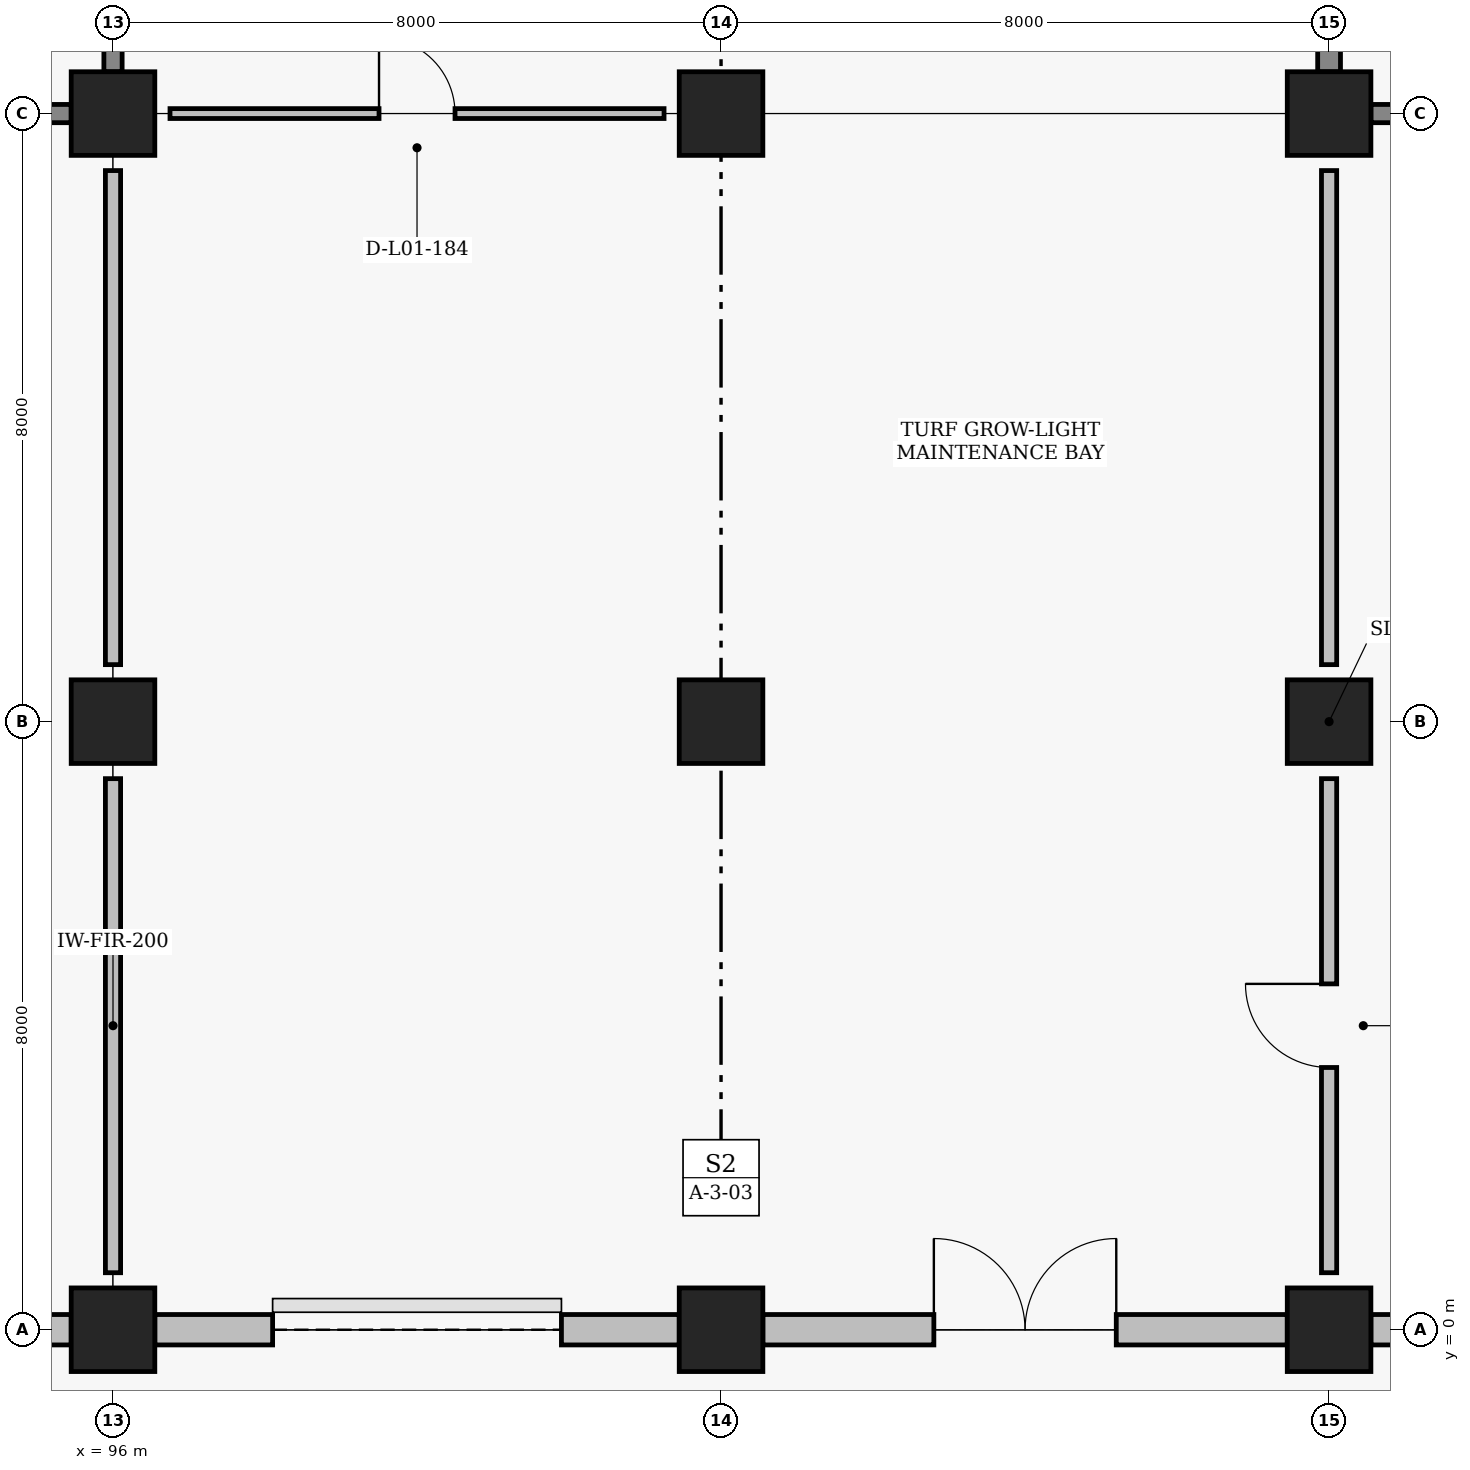
"""IFC4 building model, lengths in metres.
Left out: names, types, materials, properties, quantities, classifications, styles, units other than length and angle.
Written with IfcOpenShell. Run it as: python <this file> out.ifc"""

import sys

from ifc_helpers import new_model, si_unit, direction, frame, frame_2d, origin, origin_2d, place, context, subcontext, project, spatial, rectangle, extrude, element, fill, save


model = new_model("IFC4")
c1 = context("Model", 3, precision=1e-05, world=origin(), true_north=direction((0.0, 1.0)))
c2 = subcontext(c1, "Body", "Model", "MODEL_VIEW")
j1 = project(units=[si_unit("LENGTHUNIT", "METRE"), si_unit("PLANEANGLEUNIT", "RADIAN")], contexts=[c1])
p1 = place(None, origin())
s1 = spatial("IfcSite", under=j1, at=p1, CompositionType="ELEMENT")
p2 = place(p1, origin())
s2 = spatial("IfcBuilding", under=s1, at=p2, CompositionType="ELEMENT")
p3 = place(p2, origin())
s3 = spatial("IfcBuildingStorey", under=s2, at=p3, CompositionType="ELEMENT", Elevation=0.0)
for number, where, z_axis, x_axis in (
    (1, (96.0, 0.0, 0.0), (0.0, 0.0, 1.0), (1.0, 0.0, 0.0)),
    (2, (96.0, 8.0, 0.0), (0.0, 0.0, 1.0), (1.0, 0.0, 0.0)),
    (3, (96.0, 16.0, 0.0), (0.0, 0.0, 1.0), (1.0, 0.0, 0.0)),
    (4, (104.0, 0.0, 0.0), (0.0, 0.0, 1.0), (1.0, 0.0, 0.0)),
    (5, (104.0, 8.0, 0.0), (0.0, 0.0, 1.0), (1.0, 0.0, 0.0)),
    (6, (104.0, 16.0, 0.0), (0.0, 0.0, 1.0), (1.0, 0.0, 0.0)),
    (7, (112.0, 0.0, 0.0), (0.0, 0.0, 1.0), (1.0, 0.0, 0.0)),
    (8, (112.0, 8.0, 0.0), (0.0, 0.0, 1.0), (1.0, 0.0, 0.0)),
    (9, (112.0, 16.0, 0.0), (0.0, 0.0, 1.0), (1.0, 0.0, 0.0)),
):
    element("IfcColumn", number, at=place(p3, frame(where, z_axis=z_axis, x_axis=x_axis)), inside=s3, PredefinedType="COLUMN", context=c2, shape_type="SweptSolid", body=[
        extrude(rectangle(XDim=1.1, YDim=1.1, at=origin_2d()), origin(), (0.0, 0.0, 1.0), 4.8),
    ])
p4 = place(p3, frame((95.45, 0.0, 0.0), z_axis=(0.0, 0.0, 1.0), x_axis=(-1.0, 0.0, 0.0)))
e10 = element("IfcWall", 10, at=p4, inside=s3, PredefinedType="SOLIDWALL", context=c2, shape_type="SweptSolid", body=[
    extrude(rectangle(XDim=6.9, YDim=0.4, at=frame_2d((3.45, 0.0))), origin(), (0.0, 0.0, 1.0), 3.81),
])
p5 = place(p4, frame((2.75, 0.0, 0.0)))
e11 = element("IfcOpeningElement", 11, at=p5, cuts=e10, PredefinedType="OPENING", context=c2, shape_type="SweptSolid", body=[
    extrude(rectangle(XDim=1.4, YDim=2.2, at=frame_2d((0.7, 1.1))), frame((0.0, 0.21, 0.0), z_axis=(0.0, -1.0, 0.0), x_axis=(1.0, 0.0, 0.0)), (0.0, 0.0, 1.0), 0.42),
])
p6 = place(p3, frame((96.55, 0.0, 0.0), z_axis=(0.0, 0.0, 1.0), x_axis=(1.0, 0.0, 0.0)))
e12 = element("IfcWall", 12, at=p6, inside=s3, PredefinedType="SOLIDWALL", context=c2, shape_type="SweptSolid", body=[
    extrude(rectangle(XDim=6.9, YDim=0.4, at=frame_2d((3.45, 0.0))), origin(), (0.0, 0.0, 1.0), 3.81),
])
p7 = place(p6, frame((1.55, 0.0, 0.0)))
e13 = element("IfcOpeningElement", 13, at=p7, cuts=e12, PredefinedType="OPENING", context=c2, shape_type="SweptSolid", body=[
    extrude(rectangle(XDim=3.8, YDim=3.4, at=frame_2d((1.9, 1.7))), frame((0.0, 0.21, 0.0), z_axis=(0.0, -1.0, 0.0), x_axis=(1.0, 0.0, 0.0)), (0.0, 0.0, 1.0), 0.42),
])
p8 = place(p3, frame((104.55, 0.0, 0.0), z_axis=(0.0, 0.0, 1.0), x_axis=(1.0, 0.0, 0.0)))
e14 = element("IfcWall", 14, at=p8, inside=s3, PredefinedType="SOLIDWALL", context=c2, shape_type="SweptSolid", body=[
    extrude(rectangle(XDim=6.9, YDim=0.4, at=frame_2d((3.45, 0.0))), origin(), (0.0, 0.0, 1.0), 3.81),
])
p9 = place(p8, frame((2.25, 0.0, 0.0)))
e15 = element("IfcOpeningElement", 15, at=p9, cuts=e14, PredefinedType="OPENING", context=c2, shape_type="SweptSolid", body=[
    extrude(rectangle(XDim=2.4, YDim=2.4, at=frame_2d((1.2, 1.2))), frame((0.0, 0.21, 0.0), z_axis=(0.0, -1.0, 0.0), x_axis=(1.0, 0.0, 0.0)), (0.0, 0.0, 1.0), 0.42),
])
p10 = place(p3, frame((119.45, 0.0, 0.0), z_axis=(0.0, 0.0, 1.0), x_axis=(-1.0, 0.0, 0.0)))
e16 = element("IfcWall", 16, at=p10, inside=s3, PredefinedType="SOLIDWALL", context=c2, shape_type="SweptSolid", body=[
    extrude(rectangle(XDim=6.9, YDim=0.4, at=frame_2d((3.45, 0.0))), origin(), (0.0, 0.0, 1.0), 3.81),
])
p11 = place(p10, frame((2.75, 0.0, 0.0)))
e17 = element("IfcOpeningElement", 17, at=p11, cuts=e16, PredefinedType="OPENING", context=c2, shape_type="SweptSolid", body=[
    extrude(rectangle(XDim=1.4, YDim=2.2, at=frame_2d((0.7, 1.1))), frame((0.0, 0.21, 0.0), z_axis=(0.0, -1.0, 0.0), x_axis=(1.0, 0.0, 0.0)), (0.0, 0.0, 1.0), 0.42),
])
p12 = place(p3, frame((88.55, 16.0, 0.0), z_axis=(0.0, 0.0, 1.0), x_axis=(1.0, 0.0, 0.0)))
e18 = element("IfcWall", 18, at=p12, inside=s3, PredefinedType="SHEAR", context=c2, shape_type="SweptSolid", body=[
    extrude(rectangle(XDim=6.9, YDim=0.24, at=frame_2d((3.45, 0.0))), origin(), (0.0, 0.0, 1.0), 2.34),
])
p13 = place(p12, frame((4.75, 0.0, 0.0)))
e19 = element("IfcOpeningElement", 19, at=p13, cuts=e18, PredefinedType="OPENING", context=c2, shape_type="SweptSolid", body=[
    extrude(rectangle(XDim=1.1, YDim=2.2, at=frame_2d((0.55, 1.1))), frame((0.0, 0.13, 0.0), z_axis=(0.0, -1.0, 0.0), x_axis=(1.0, 0.0, 0.0)), (0.0, 0.0, 1.0), 0.26),
])
p14 = place(p3, frame((96.0, 16.55, 0.0), z_axis=(0.0, 0.0, 1.0), x_axis=(0.0, 1.0, 0.0)))
e20 = element("IfcWall", 20, at=p14, inside=s3, PredefinedType="SHEAR", context=c2, shape_type="SweptSolid", body=[
    extrude(rectangle(XDim=6.9, YDim=0.24, at=frame_2d((3.45, 0.0))), origin(), (0.0, 0.0, 1.0), 3.66),
])
p15 = place(p3, frame((112.55, 16.0, 0.0), z_axis=(0.0, 0.0, 1.0), x_axis=(1.0, 0.0, 0.0)))
e21 = element("IfcWall", 21, at=p15, inside=s3, PredefinedType="SHEAR", context=c2, shape_type="SweptSolid", body=[
    extrude(rectangle(XDim=6.9, YDim=0.24, at=frame_2d((3.45, 0.0))), origin(), (0.0, 0.0, 1.0), 3.66),
])
p16 = place(p15, frame((4.75, 0.0, 0.0)))
e22 = element("IfcOpeningElement", 22, at=p16, cuts=e21, PredefinedType="OPENING", context=c2, shape_type="SweptSolid", body=[
    extrude(rectangle(XDim=1.1, YDim=2.2, at=frame_2d((0.55, 1.1))), frame((0.0, 0.13, 0.0), z_axis=(0.0, -1.0, 0.0), x_axis=(1.0, 0.0, 0.0)), (0.0, 0.0, 1.0), 0.26),
])
p17 = place(p3, frame((112.0, 16.55, 0.0), z_axis=(0.0, 0.0, 1.0), x_axis=(0.0, 1.0, 0.0)))
e23 = element("IfcWall", 23, at=p17, inside=s3, PredefinedType="SHEAR", context=c2, shape_type="SweptSolid", body=[
    extrude(rectangle(XDim=6.9, YDim=0.3, at=frame_2d((3.45, 0.0))), origin(), (0.0, 0.0, 1.0), 3.66),
])
for number, where, z_axis, x_axis in (
    (24, (96.0, 0.75, 0.0), (0.0, 0.0, 1.0), (0.0, 1.0, 0.0)),
    (25, (96.0, 8.75, 0.0), (0.0, 0.0, 1.0), (0.0, 1.0, 0.0)),
):
    element("IfcWall", number, at=place(p3, frame(where, z_axis=z_axis, x_axis=x_axis)), inside=s3, PredefinedType="PARTITIONING", context=c2, shape_type="SweptSolid", body=[
        extrude(rectangle(XDim=6.5, YDim=0.2, at=frame_2d((3.25, 0.0))), origin(), (0.0, 0.0, 1.0), 3.81),
    ])
p18 = place(p3, frame((112.0, 0.75, 0.0), z_axis=(0.0, 0.0, 1.0), x_axis=(0.0, 1.0, 0.0)))
e26 = element("IfcWall", 26, at=p18, inside=s3, PredefinedType="PARTITIONING", context=c2, shape_type="SweptSolid", body=[
    extrude(rectangle(XDim=6.5, YDim=0.2, at=frame_2d((3.25, 0.0))), origin(), (0.0, 0.0, 1.0), 3.81),
])
p19 = place(p18, frame((2.7, 0.0, 0.0)))
e27 = element("IfcOpeningElement", 27, at=p19, cuts=e26, PredefinedType="OPENING", context=c2, shape_type="SweptSolid", body=[
    extrude(rectangle(XDim=1.1, YDim=2.2, at=frame_2d((0.55, 1.1))), frame((0.0, 0.11, 0.0), z_axis=(0.0, -1.0, 0.0), x_axis=(1.0, 0.0, 0.0)), (0.0, 0.0, 1.0), 0.22),
])
p20 = place(p3, frame((112.0, 8.75, 0.0), z_axis=(0.0, 0.0, 1.0), x_axis=(0.0, 1.0, 0.0)))
e28 = element("IfcWall", 28, at=p20, inside=s3, PredefinedType="PARTITIONING", context=c2, shape_type="SweptSolid", body=[
    extrude(rectangle(XDim=6.5, YDim=0.2, at=frame_2d((3.25, 0.0))), origin(), (0.0, 0.0, 1.0), 3.81),
])
p21 = place(p3, frame((96.75, 16.0, 0.0), z_axis=(0.0, 0.0, 1.0), x_axis=(1.0, 0.0, 0.0)))
e29 = element("IfcWall", 29, at=p21, inside=s3, PredefinedType="PARTITIONING", context=c2, shape_type="SweptSolid", body=[
    extrude(rectangle(XDim=6.5, YDim=0.13, at=frame_2d((3.25, 0.0))), origin(), (0.0, 0.0, 1.0), 3.91),
])
p22 = place(p21, frame((2.75, 0.0, 0.0)))
e30 = element("IfcOpeningElement", 30, at=p22, cuts=e29, PredefinedType="OPENING", context=c2, shape_type="SweptSolid", body=[
    extrude(rectangle(XDim=1.0, YDim=2.1, at=frame_2d((0.5, 1.05))), frame((0.0, 0.075, 0.0), z_axis=(0.0, -1.0, 0.0), x_axis=(1.0, 0.0, 0.0)), (0.0, 0.0, 1.0), 0.15),
])
p23 = place(p7, origin())
e31 = element("IfcDoor", 31, at=p23, inside=s3, OperationType="ROLLINGUP", PredefinedType="GATE", context=c2, shape_type="SweptSolid", body=[
    extrude(rectangle(XDim=3.8, YDim=3.4, at=frame_2d((1.9, 1.7))), frame((0.0, 0.025, 0.0), z_axis=(0.0, -1.0, 0.0), x_axis=(1.0, 0.0, 0.0)), (0.0, 0.0, 1.0), 0.05),
])
fill(e13, e31)
p24 = place(p9, origin())
e32 = element("IfcDoor", 32, at=p24, inside=s3, OperationType="DOUBLE_SWING_LEFT", PredefinedType="DOOR", context=c2, shape_type="SweptSolid", body=[
    extrude(rectangle(XDim=2.4, YDim=2.4, at=frame_2d((1.2, 1.2))), frame((0.0, 0.025, 0.0), z_axis=(0.0, -1.0, 0.0), x_axis=(1.0, 0.0, 0.0)), (0.0, 0.0, 1.0), 0.05),
])
fill(e15, e32)
p25 = place(p19, origin())
e33 = element("IfcDoor", 33, at=p25, inside=s3, OperationType="SINGLE_SWING_RIGHT", PredefinedType="DOOR", context=c2, shape_type="SweptSolid", body=[
    extrude(rectangle(XDim=1.1, YDim=2.2, at=frame_2d((0.55, 1.1))), frame((0.0, 0.025, 0.0), z_axis=(0.0, -1.0, 0.0), x_axis=(1.0, 0.0, 0.0)), (0.0, 0.0, 1.0), 0.05),
])
fill(e27, e33)
p26 = place(p22, origin())
e34 = element("IfcDoor", 34, at=p26, inside=s3, OperationType="SINGLE_SWING_LEFT", PredefinedType="DOOR", context=c2, shape_type="SweptSolid", body=[
    extrude(rectangle(XDim=1.0, YDim=2.1, at=frame_2d((0.5, 1.05))), frame((0.0, 0.025, 0.0), z_axis=(0.0, -1.0, 0.0), x_axis=(1.0, 0.0, 0.0)), (0.0, 0.0, 1.0), 0.05),
])
fill(e30, e34)
save(model, sys.argv[1])
